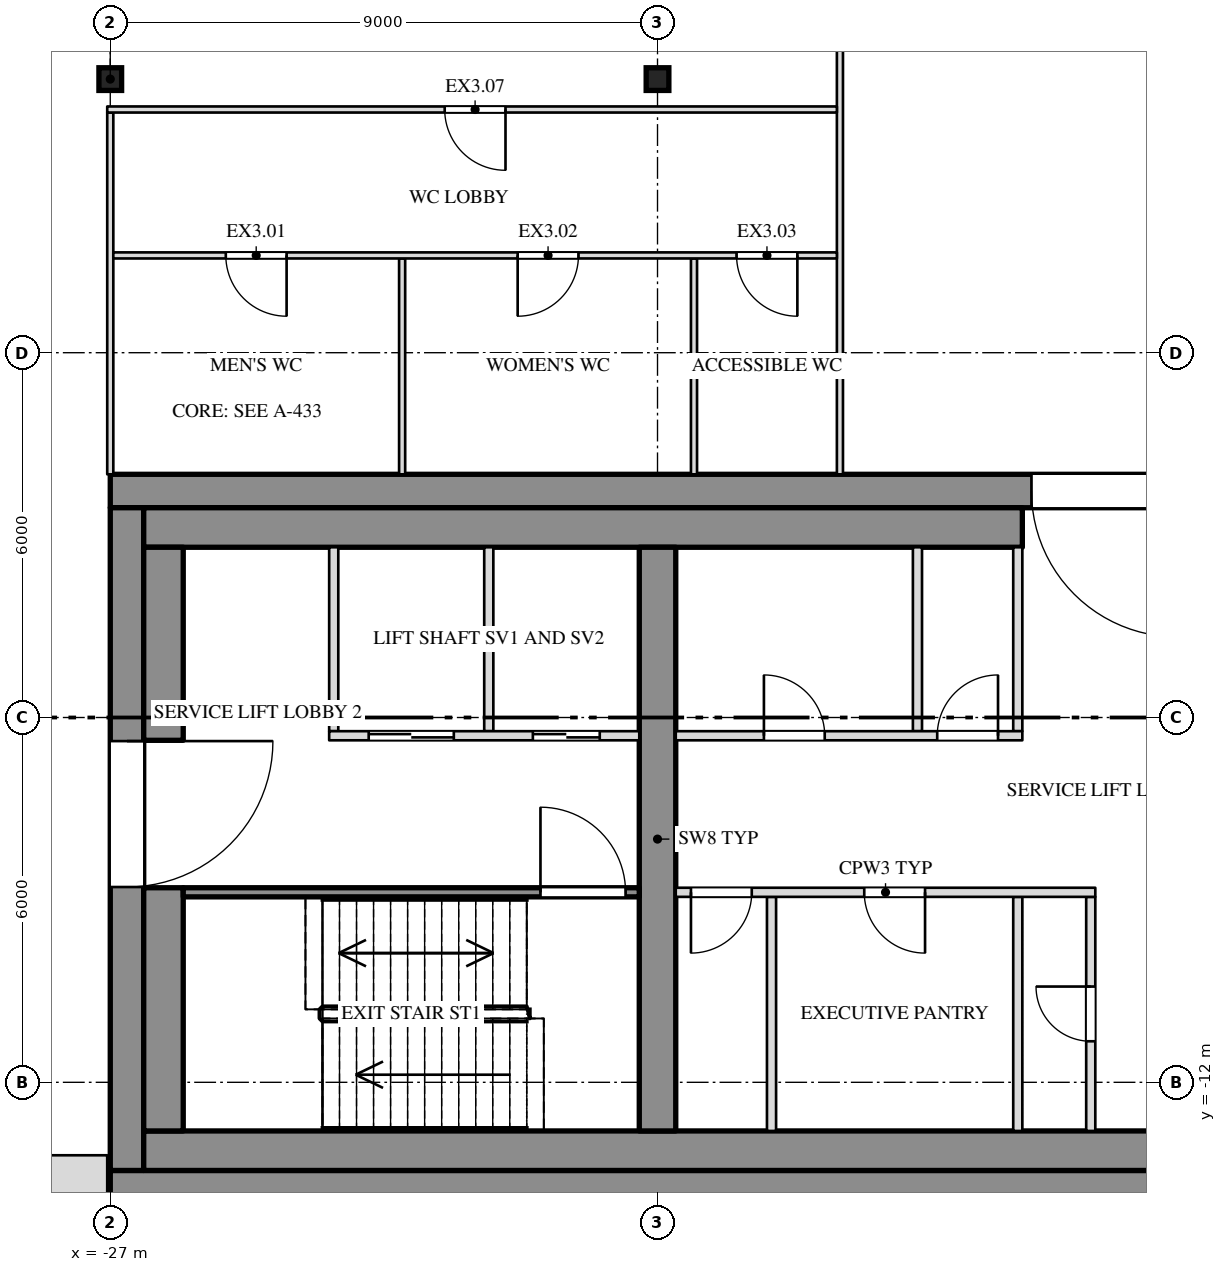
"""IFC4 building model, lengths in metres.
Left out: names, types, materials, properties, quantities, classifications, styles, units other than length and angle.
Written with IfcOpenShell. Run it as: python <this file> out.ifc"""

import sys

from ifc_helpers import new_model, si_unit, direction, frame, frame_2d, origin, origin_2d, place, context, subcontext, project, spatial, rectangle, i_section, extrude, element, fill, save


model = new_model("IFC4")
c1 = context("Model", 3, precision=1e-05, world=origin(), true_north=direction((0.0, 1.0)))
c2 = subcontext(c1, "Body", "Model", "MODEL_VIEW")
j1 = project(units=[si_unit("LENGTHUNIT", "METRE"), si_unit("PLANEANGLEUNIT", "RADIAN")], contexts=[c1])
p1 = place(None, origin())
s1 = spatial("IfcSite", under=j1, at=p1, CompositionType="ELEMENT")
p2 = place(p1, origin())
s2 = spatial("IfcBuilding", under=s1, at=p2, CompositionType="ELEMENT")
p3 = place(p2, frame((0.0, 0.0, 280.5)))
s3 = spatial("IfcBuildingStorey", under=s2, at=p3, CompositionType="ELEMENT", Elevation=280.5)
for number, where, z_axis, x_axis in (
    (1, (-27.0, 4.5, 0.0), (0.0, 0.0, 1.0), (1.0, 0.0, 0.0)),
    (2, (-18.0, 4.5, 0.0), (0.0, 0.0, 1.0), (1.0, 0.0, 0.0)),
):
    element("IfcColumn", number, at=place(p3, frame(where, z_axis=z_axis, x_axis=x_axis)), inside=s3, PredefinedType="COLUMN", context=c2, shape_type="SweptSolid", body=[
        extrude(i_section(OverallWidth=0.373, OverallDepth=0.373, WebThickness=0.016, FlangeThickness=0.026, at=origin_2d()), origin(), (0.0, 0.0, 1.0), 4.0),
    ])
p4 = place(p3, frame((-27.0, -2.275, 0.0), z_axis=(0.0, 0.0, 1.0), x_axis=(1.0, 0.0, 0.0)))
e3 = element("IfcWall", 3, at=p4, inside=s3, PredefinedType="SHEAR", context=c2, shape_type="SweptSolid", body=[
    extrude(rectangle(XDim=54.0, YDim=0.55, at=frame_2d((27.0, 0.0))), origin(), (0.0, 0.0, 1.0), 3.78),
])
p5 = place(p4, frame((15.15, 0.0, 0.0)))
e4 = element("IfcOpeningElement", 4, at=p5, cuts=e3, PredefinedType="OPENING", context=c2, shape_type="SweptSolid", body=[
    extrude(rectangle(XDim=2.4, YDim=2.1, at=frame_2d((1.2, 1.05))), frame((0.0, 0.287, 0.0), z_axis=(0.0, -1.0, 0.0), x_axis=(1.0, 0.0, 0.0)), (0.0, 0.0, 1.0), 0.574),
])
p6 = place(p4, frame((36.45, 0.0, 0.0)))
e5 = element("IfcOpeningElement", 5, at=p6, cuts=e3, PredefinedType="OPENING", context=c2, shape_type="SweptSolid", body=[
    extrude(rectangle(XDim=2.4, YDim=2.1, at=frame_2d((1.2, 1.05))), frame((0.0, 0.287, 0.0), z_axis=(0.0, -1.0, 0.0), x_axis=(1.0, 0.0, 0.0)), (0.0, 0.0, 1.0), 0.574),
])
p7 = place(p3, frame((-27.0, -13.725, 0.0), z_axis=(0.0, 0.0, 1.0), x_axis=(1.0, 0.0, 0.0)))
e6 = element("IfcWall", 6, at=p7, inside=s3, PredefinedType="SHEAR", context=c2, shape_type="SweptSolid", body=[
    extrude(rectangle(XDim=54.0, YDim=0.55, at=frame_2d((27.0, 0.0))), origin(), (0.0, 0.0, 1.0), 3.78),
])
p8 = place(p3, frame((-26.725, -13.45, 0.0), z_axis=(0.0, 0.0, 1.0), x_axis=(0.0, 1.0, 0.0)))
e7 = element("IfcWall", 7, at=p8, inside=s3, PredefinedType="SHEAR", context=c2, shape_type="SweptSolid", body=[
    extrude(rectangle(XDim=10.9, YDim=0.55, at=frame_2d((5.45, 0.0))), origin(), (0.0, 0.0, 1.0), 3.78),
])
p9 = place(p8, frame((4.662, 0.0, 0.0)))
e8 = element("IfcOpeningElement", 8, at=p9, cuts=e7, PredefinedType="OPENING", context=c2, shape_type="SweptSolid", body=[
    extrude(rectangle(XDim=2.4, YDim=2.1, at=frame_2d((1.2, 1.05))), frame((0.0, 0.287, 0.0), z_axis=(0.0, -1.0, 0.0), x_axis=(1.0, 0.0, 0.0)), (0.0, 0.0, 1.0), 0.574),
])
p10 = place(p3, frame((-26.45, -2.875, 0.0), z_axis=(0.0, 0.0, 1.0), x_axis=(1.0, 0.0, 0.0)))
e9 = element("IfcWall", 9, at=p10, inside=s3, PredefinedType="SHEAR", context=c2, shape_type="SweptSolid", body=[
    extrude(rectangle(XDim=14.45, YDim=0.65, at=frame_2d((7.225, 0.0))), origin(), (0.0, 0.0, 1.0), 3.78),
])
p11 = place(p3, frame((-26.45, -13.125, 0.0), z_axis=(0.0, 0.0, 1.0), x_axis=(1.0, 0.0, 0.0)))
e10 = element("IfcWall", 10, at=p11, inside=s3, PredefinedType="SHEAR", context=c2, shape_type="SweptSolid", body=[
    extrude(rectangle(XDim=52.9, YDim=0.65, at=frame_2d((26.45, 0.0))), origin(), (0.0, 0.0, 1.0), 3.78),
])
p12 = place(p3, frame((-26.125, -12.8, 0.0), z_axis=(0.0, 0.0, 1.0), x_axis=(0.0, 1.0, 0.0)))
e11 = element("IfcWall", 11, at=p12, inside=s3, PredefinedType="SHEAR", context=c2, shape_type="SweptSolid", body=[
    extrude(rectangle(XDim=4.0, YDim=0.65, at=frame_2d((2.0, 0.0))), origin(), (0.0, 0.0, 1.0), 3.78),
])
p13 = place(p3, frame((-26.125, -6.375, 0.0), z_axis=(0.0, 0.0, 1.0), x_axis=(0.0, 1.0, 0.0)))
e12 = element("IfcWall", 12, at=p13, inside=s3, PredefinedType="SHEAR", context=c2, shape_type="SweptSolid", body=[
    extrude(rectangle(XDim=3.175, YDim=0.65, at=frame_2d((1.587, 0.0))), origin(), (0.0, 0.0, 1.0), 3.78),
])
p14 = place(p3, frame((-18.0, -12.8, 0.0), z_axis=(0.0, 0.0, 1.0), x_axis=(0.0, 1.0, 0.0)))
e13 = element("IfcWall", 13, at=p14, inside=s3, PredefinedType="SHEAR", context=c2, shape_type="SweptSolid", body=[
    extrude(rectangle(XDim=9.6, YDim=0.6, at=frame_2d((4.8, 0.0))), origin(), (0.0, 0.0, 1.0), 3.78),
])
p15 = place(p3, frame((-27.0, -2.0, 0.0), z_axis=(0.0, 0.0, 1.0), x_axis=(0.0, 1.0, 0.0)))
e14 = element("IfcWall", 14, at=p15, inside=s3, PredefinedType="PARTITIONING", context=c2, shape_type="SweptSolid", body=[
    extrude(rectangle(XDim=5.95, YDim=0.1, at=frame_2d((2.975, 0.0))), origin(), (0.0, 0.0, 1.0), 2.848),
])
for number, where, z_axis, x_axis in (
    (15, (-22.2, -2.0, 0.0), (0.0, 0.0, 1.0), (0.0, 1.0, 0.0)),
    (16, (-17.4, -2.0, 0.0), (0.0, 0.0, 1.0), (0.0, 1.0, 0.0)),
):
    element("IfcWall", number, at=place(p3, frame(where, z_axis=z_axis, x_axis=x_axis)), inside=s3, PredefinedType="PARTITIONING", context=c2, shape_type="SweptSolid", body=[
        extrude(rectangle(XDim=3.55, YDim=0.1, at=frame_2d((1.775, 0.0))), origin(), (0.0, 0.0, 1.0), 3.78),
    ])
p16 = place(p3, frame((-15.0, -2.0, 0.0), z_axis=(0.0, 0.0, 1.0), x_axis=(0.0, 1.0, 0.0)))
e17 = element("IfcWall", 17, at=p16, inside=s3, PredefinedType="PARTITIONING", context=c2, shape_type="SweptSolid", body=[
    extrude(rectangle(XDim=38.2, YDim=0.1, at=frame_2d((19.1, 0.0))), origin(), (0.0, 0.0, 1.0), 3.78),
])
p17 = place(p16, frame((13.03, 0.0, 0.0)))
e18 = element("IfcOpeningElement", 18, at=p17, cuts=e17, PredefinedType="OPENING", context=c2, shape_type="SweptSolid", body=[
    extrude(rectangle(XDim=0.9, YDim=2.1, at=frame_2d((0.45, 1.05))), frame((0.0, 0.062, 0.0), z_axis=(0.0, -1.0, 0.0), x_axis=(1.0, 0.0, 0.0)), (0.0, 0.0, 1.0), 0.124),
])
p18 = place(p16, frame((22.77, 0.0, 0.0)))
e19 = element("IfcOpeningElement", 19, at=p18, cuts=e17, PredefinedType="OPENING", context=c2, shape_type="SweptSolid", body=[
    extrude(rectangle(XDim=0.9, YDim=2.1, at=frame_2d((0.45, 1.05))), frame((0.0, 0.062, 0.0), z_axis=(0.0, -1.0, 0.0), x_axis=(1.0, 0.0, 0.0)), (0.0, 0.0, 1.0), 0.124),
])
p19 = place(p16, frame((32.71, 0.0, 0.0)))
e20 = element("IfcOpeningElement", 20, at=p19, cuts=e17, PredefinedType="OPENING", context=c2, shape_type="SweptSolid", body=[
    extrude(rectangle(XDim=0.9, YDim=2.1, at=frame_2d((0.45, 1.05))), frame((0.0, 0.062, 0.0), z_axis=(0.0, -1.0, 0.0), x_axis=(1.0, 0.0, 0.0)), (0.0, 0.0, 1.0), 0.124),
])
p20 = place(p3, frame((-26.95, 1.6, 0.0), z_axis=(0.0, 0.0, 1.0), x_axis=(1.0, 0.0, 0.0)))
e21 = element("IfcWall", 21, at=p20, inside=s3, PredefinedType="PARTITIONING", context=c2, shape_type="SweptSolid", body=[
    extrude(rectangle(XDim=11.9, YDim=0.1, at=frame_2d((5.95, 0.0))), origin(), (0.0, 0.0, 1.0), 3.78),
])
p21 = place(p20, frame((1.85, 0.0, 0.0)))
e22 = element("IfcOpeningElement", 22, at=p21, cuts=e21, PredefinedType="OPENING", context=c2, shape_type="SweptSolid", body=[
    extrude(rectangle(XDim=1.0, YDim=2.1, at=frame_2d((0.5, 1.05))), frame((0.0, 0.062, 0.0), z_axis=(0.0, -1.0, 0.0), x_axis=(1.0, 0.0, 0.0)), (0.0, 0.0, 1.0), 0.124),
])
p22 = place(p20, frame((6.65, 0.0, 0.0)))
e23 = element("IfcOpeningElement", 23, at=p22, cuts=e21, PredefinedType="OPENING", context=c2, shape_type="SweptSolid", body=[
    extrude(rectangle(XDim=1.0, YDim=2.1, at=frame_2d((0.5, 1.05))), frame((0.0, 0.062, 0.0), z_axis=(0.0, -1.0, 0.0), x_axis=(1.0, 0.0, 0.0)), (0.0, 0.0, 1.0), 0.124),
])
p23 = place(p20, frame((10.25, 0.0, 0.0)))
e24 = element("IfcOpeningElement", 24, at=p23, cuts=e21, PredefinedType="OPENING", context=c2, shape_type="SweptSolid", body=[
    extrude(rectangle(XDim=1.0, YDim=2.1, at=frame_2d((0.5, 1.05))), frame((0.0, 0.062, 0.0), z_axis=(0.0, -1.0, 0.0), x_axis=(1.0, 0.0, 0.0)), (0.0, 0.0, 1.0), 0.124),
])
p24 = place(p3, frame((-27.05, 4.0, 0.0), z_axis=(0.0, 0.0, 1.0), x_axis=(1.0, 0.0, 0.0)))
e25 = element("IfcWall", 25, at=p24, inside=s3, PredefinedType="PARTITIONING", context=c2, shape_type="SweptSolid", body=[
    extrude(rectangle(XDim=12.0, YDim=0.1, at=frame_2d((6.0, 0.0))), origin(), (0.0, 0.0, 1.0), 3.78),
])
p25 = place(p24, frame((5.55, 0.0, 0.0)))
e26 = element("IfcOpeningElement", 26, at=p25, cuts=e25, PredefinedType="OPENING", context=c2, shape_type="SweptSolid", body=[
    extrude(rectangle(XDim=1.0, YDim=2.1, at=frame_2d((0.5, 1.05))), frame((0.0, 0.062, 0.0), z_axis=(0.0, -1.0, 0.0), x_axis=(1.0, 0.0, 0.0)), (0.0, 0.0, 1.0), 0.124),
])
p26 = place(p3, frame((-29.948, -13.6, 0.0), z_axis=(0.0, 0.0, 1.0), x_axis=(1.0, 0.0, 0.0)))
e27 = element("IfcWall", 27, at=p26, inside=s3, PredefinedType="SOLIDWALL", context=c2, shape_type="SweptSolid", body=[
    extrude(rectangle(XDim=2.897, YDim=0.8, at=frame_2d((1.449, 0.0))), origin(), (0.0, 0.0, 1.0), 3.78),
])
for number, where, z_axis, x_axis in (
    (28, (-20.775, -6.225, 0.0), (0.0, 0.0, 1.0), (0.0, 1.0, 0.0)),
    (29, (-23.325, -6.225, 0.0), (0.0, 0.0, 1.0), (0.0, 1.0, 0.0)),
    (30, (-12.075, -6.225, 0.0), (0.0, 0.0, 1.0), (0.0, 1.0, 0.0)),
    (31, (-13.725, -6.225, 0.0), (0.0, 0.0, 1.0), (0.0, 1.0, 0.0)),
):
    element("IfcWall", number, at=place(p3, frame(where, z_axis=z_axis, x_axis=x_axis)), inside=s3, PredefinedType="PARTITIONING", context=c2, shape_type="SweptSolid", body=[
        extrude(rectangle(XDim=3.025, YDim=0.15, at=frame_2d((1.513, 0.0))), origin(), (0.0, 0.0, 1.0), 3.78),
    ])
p27 = place(p3, frame((-10.875, -12.8, 0.0), z_axis=(0.0, 0.0, 1.0), x_axis=(0.0, 1.0, 0.0)))
e32 = element("IfcWall", 32, at=p27, inside=s3, PredefinedType="PARTITIONING", context=c2, shape_type="SweptSolid", body=[
    extrude(rectangle(XDim=3.85, YDim=0.15, at=frame_2d((1.925, 0.0))), origin(), (0.0, 0.0, 1.0), 3.78),
])
p28 = place(p27, frame((1.475, 0.0, 0.0)))
e33 = element("IfcOpeningElement", 33, at=p28, cuts=e32, PredefinedType="OPENING", context=c2, shape_type="SweptSolid", body=[
    extrude(rectangle(XDim=0.9, YDim=2.1, at=frame_2d((0.45, 1.05))), frame((0.0, 0.087, 0.0), z_axis=(0.0, -1.0, 0.0), x_axis=(1.0, 0.0, 0.0)), (0.0, 0.0, 1.0), 0.174),
])
for number, where, z_axis, x_axis in (
    (34, (-12.075, -12.8, 0.0), (0.0, 0.0, 1.0), (0.0, 1.0, 0.0)),
    (35, (-16.125, -12.8, 0.0), (0.0, 0.0, 1.0), (0.0, 1.0, 0.0)),
):
    element("IfcWall", number, at=place(p3, frame(where, z_axis=z_axis, x_axis=x_axis)), inside=s3, PredefinedType="PARTITIONING", context=c2, shape_type="SweptSolid", body=[
        extrude(rectangle(XDim=3.85, YDim=0.15, at=frame_2d((1.925, 0.0))), origin(), (0.0, 0.0, 1.0), 3.78),
    ])
p29 = place(p3, frame((-23.4, -6.3, 0.0), z_axis=(0.0, 0.0, 1.0), x_axis=(1.0, 0.0, 0.0)))
e36 = element("IfcWall", 36, at=p29, inside=s3, PredefinedType="PARTITIONING", context=c2, shape_type="SweptSolid", body=[
    extrude(rectangle(XDim=5.1, YDim=0.15, at=frame_2d((2.55, 0.0))), origin(), (0.0, 0.0, 1.0), 3.78),
])
p30 = place(p29, frame((0.65, 0.0, 0.0)))
e37 = element("IfcOpeningElement", 37, at=p30, cuts=e36, PredefinedType="OPENING", context=c2, shape_type="SweptSolid", body=[
    extrude(rectangle(XDim=1.4, YDim=2.1, at=frame_2d((0.7, 1.05))), frame((0.0, 0.087, 0.0), z_axis=(0.0, -1.0, 0.0), x_axis=(1.0, 0.0, 0.0)), (0.0, 0.0, 1.0), 0.174),
])
p31 = place(p29, frame((3.35, 0.0, 0.0)))
e38 = element("IfcOpeningElement", 38, at=p31, cuts=e36, PredefinedType="OPENING", context=c2, shape_type="SweptSolid", body=[
    extrude(rectangle(XDim=1.1, YDim=2.1, at=frame_2d((0.55, 1.05))), frame((0.0, 0.087, 0.0), z_axis=(0.0, -1.0, 0.0), x_axis=(1.0, 0.0, 0.0)), (0.0, 0.0, 1.0), 0.174),
])
p32 = place(p3, frame((-17.7, -6.3, 0.0), z_axis=(0.0, 0.0, 1.0), x_axis=(1.0, 0.0, 0.0)))
e39 = element("IfcWall", 39, at=p32, inside=s3, PredefinedType="PARTITIONING", context=c2, shape_type="SweptSolid", body=[
    extrude(rectangle(XDim=5.7, YDim=0.15, at=frame_2d((2.85, 0.0))), origin(), (0.0, 0.0, 1.0), 3.78),
])
p33 = place(p32, frame((1.45, 0.0, 0.0)))
e40 = element("IfcOpeningElement", 40, at=p33, cuts=e39, PredefinedType="OPENING", context=c2, shape_type="SweptSolid", body=[
    extrude(rectangle(XDim=1.0, YDim=2.1, at=frame_2d((0.5, 1.05))), frame((0.0, 0.087, 0.0), z_axis=(0.0, -1.0, 0.0), x_axis=(1.0, 0.0, 0.0)), (0.0, 0.0, 1.0), 0.174),
])
p34 = place(p32, frame((4.3, 0.0, 0.0)))
e41 = element("IfcOpeningElement", 41, at=p34, cuts=e39, PredefinedType="OPENING", context=c2, shape_type="SweptSolid", body=[
    extrude(rectangle(XDim=1.0, YDim=2.1, at=frame_2d((0.5, 1.05))), frame((0.0, 0.087, 0.0), z_axis=(0.0, -1.0, 0.0), x_axis=(1.0, 0.0, 0.0)), (0.0, 0.0, 1.0), 0.174),
])
p35 = place(p3, frame((-25.8, -8.875, 0.0), z_axis=(0.0, 0.0, 1.0), x_axis=(1.0, 0.0, 0.0)))
e42 = element("IfcWall", 42, at=p35, inside=s3, PredefinedType="SHEAR", context=c2, shape_type="SweptSolid", body=[
    extrude(rectangle(XDim=7.5, YDim=0.15, at=frame_2d((3.75, 0.0))), origin(), (0.0, 0.0, 1.0), 3.78),
])
p36 = place(p35, frame((5.875, 0.0, 0.0)))
e43 = element("IfcOpeningElement", 43, at=p36, cuts=e42, PredefinedType="OPENING", context=c2, shape_type="SweptSolid", body=[
    extrude(rectangle(XDim=1.4, YDim=2.1, at=frame_2d((0.7, 1.05))), frame((0.0, 0.087, 0.0), z_axis=(0.0, -1.0, 0.0), x_axis=(1.0, 0.0, 0.0)), (0.0, 0.0, 1.0), 0.174),
])
p37 = place(p3, frame((-17.7, -8.875, 0.0), z_axis=(0.0, 0.0, 1.0), x_axis=(1.0, 0.0, 0.0)))
e44 = element("IfcWall", 44, at=p37, inside=s3, PredefinedType="PARTITIONING", context=c2, shape_type="SweptSolid", body=[
    extrude(rectangle(XDim=6.9, YDim=0.15, at=frame_2d((3.45, 0.0))), origin(), (0.0, 0.0, 1.0), 3.78),
])
p38 = place(p37, frame((0.25, 0.0, 0.0)))
e45 = element("IfcOpeningElement", 45, at=p38, cuts=e44, PredefinedType="OPENING", context=c2, shape_type="SweptSolid", body=[
    extrude(rectangle(XDim=1.0, YDim=2.1, at=frame_2d((0.5, 1.05))), frame((0.0, 0.087, 0.0), z_axis=(0.0, -1.0, 0.0), x_axis=(1.0, 0.0, 0.0)), (0.0, 0.0, 1.0), 0.174),
])
p39 = place(p37, frame((3.1, 0.0, 0.0)))
e46 = element("IfcOpeningElement", 46, at=p39, cuts=e44, PredefinedType="OPENING", context=c2, shape_type="SweptSolid", body=[
    extrude(rectangle(XDim=1.0, YDim=2.1, at=frame_2d((0.5, 1.05))), frame((0.0, 0.087, 0.0), z_axis=(0.0, -1.0, 0.0), x_axis=(1.0, 0.0, 0.0)), (0.0, 0.0, 1.0), 0.174),
])
p40 = place(p21, origin())
e47 = element("IfcDoor", 47, at=p40, inside=s3, OperationType="SINGLE_SWING_LEFT", PredefinedType="DOOR", context=c2, shape_type="SweptSolid", body=[
    extrude(rectangle(XDim=1.0, YDim=2.1, at=frame_2d((0.5, 1.05))), frame((0.0, 0.025, 0.0), z_axis=(0.0, -1.0, 0.0), x_axis=(1.0, 0.0, 0.0)), (0.0, 0.0, 1.0), 0.05),
])
fill(e22, e47)
p41 = place(p22, origin())
e48 = element("IfcDoor", 48, at=p41, inside=s3, OperationType="SINGLE_SWING_RIGHT", PredefinedType="DOOR", context=c2, shape_type="SweptSolid", body=[
    extrude(rectangle(XDim=1.0, YDim=2.1, at=frame_2d((0.5, 1.05))), frame((0.0, 0.025, 0.0), z_axis=(0.0, -1.0, 0.0), x_axis=(1.0, 0.0, 0.0)), (0.0, 0.0, 1.0), 0.05),
])
fill(e23, e48)
p42 = place(p23, origin())
e49 = element("IfcDoor", 49, at=p42, inside=s3, OperationType="SINGLE_SWING_LEFT", PredefinedType="DOOR", context=c2, shape_type="SweptSolid", body=[
    extrude(rectangle(XDim=1.0, YDim=2.1, at=frame_2d((0.5, 1.05))), frame((0.0, 0.025, 0.0), z_axis=(0.0, -1.0, 0.0), x_axis=(1.0, 0.0, 0.0)), (0.0, 0.0, 1.0), 0.05),
])
fill(e24, e49)
p43 = place(p25, origin())
e50 = element("IfcDoor", 50, at=p43, inside=s3, OperationType="SINGLE_SWING_LEFT", PredefinedType="DOOR", context=c2, shape_type="SweptSolid", body=[
    extrude(rectangle(XDim=1.0, YDim=2.1, at=frame_2d((0.5, 1.05))), frame((0.0, 0.025, 0.0), z_axis=(0.0, -1.0, 0.0), x_axis=(1.0, 0.0, 0.0)), (0.0, 0.0, 1.0), 0.05),
])
fill(e26, e50)
p44 = place(p9, origin())
e51 = element("IfcDoor", 51, at=p44, inside=s3, OperationType="DOUBLE_DOOR_SINGLE_SWING", PredefinedType="DOOR", context=c2, shape_type="SweptSolid", body=[
    extrude(rectangle(XDim=2.4, YDim=2.1, at=frame_2d((1.2, 1.05))), frame((0.0, 0.025, 0.0), z_axis=(0.0, -1.0, 0.0), x_axis=(1.0, 0.0, 0.0)), (0.0, 0.0, 1.0), 0.05),
])
fill(e8, e51)
p45 = place(p30, origin())
e52 = element("IfcDoor", 52, at=p45, inside=s3, OperationType="SLIDING_TO_RIGHT", PredefinedType="DOOR", context=c2, shape_type="SweptSolid", body=[
    extrude(rectangle(XDim=1.4, YDim=2.1, at=frame_2d((0.7, 1.05))), frame((0.0, 0.025, 0.0), z_axis=(0.0, -1.0, 0.0), x_axis=(1.0, 0.0, 0.0)), (0.0, 0.0, 1.0), 0.05),
])
fill(e37, e52)
p46 = place(p31, origin())
e53 = element("IfcDoor", 53, at=p46, inside=s3, OperationType="SLIDING_TO_LEFT", PredefinedType="DOOR", context=c2, shape_type="SweptSolid", body=[
    extrude(rectangle(XDim=1.1, YDim=2.1, at=frame_2d((0.55, 1.05))), frame((0.0, 0.025, 0.0), z_axis=(0.0, -1.0, 0.0), x_axis=(1.0, 0.0, 0.0)), (0.0, 0.0, 1.0), 0.05),
])
fill(e38, e53)
p47 = place(p36, origin())
e54 = element("IfcDoor", 54, at=p47, inside=s3, OperationType="DOUBLE_DOOR_SINGLE_SWING", PredefinedType="DOOR", context=c2, shape_type="SweptSolid", body=[
    extrude(rectangle(XDim=1.4, YDim=2.1, at=frame_2d((0.7, 1.05))), frame((0.0, 0.025, 0.0), z_axis=(0.0, -1.0, 0.0), x_axis=(1.0, 0.0, 0.0)), (0.0, 0.0, 1.0), 0.05),
])
fill(e43, e54)
p48 = place(p38, origin())
e55 = element("IfcDoor", 55, at=p48, inside=s3, OperationType="SINGLE_SWING_RIGHT", PredefinedType="DOOR", context=c2, shape_type="SweptSolid", body=[
    extrude(rectangle(XDim=1.0, YDim=2.1, at=frame_2d((0.5, 1.05))), frame((0.0, 0.025, 0.0), z_axis=(0.0, -1.0, 0.0), x_axis=(1.0, 0.0, 0.0)), (0.0, 0.0, 1.0), 0.05),
])
fill(e45, e55)
p49 = place(p33, origin())
e56 = element("IfcDoor", 56, at=p49, inside=s3, OperationType="SINGLE_SWING_LEFT", PredefinedType="DOOR", context=c2, shape_type="SweptSolid", body=[
    extrude(rectangle(XDim=1.0, YDim=2.1, at=frame_2d((0.5, 1.05))), frame((0.0, 0.025, 0.0), z_axis=(0.0, -1.0, 0.0), x_axis=(1.0, 0.0, 0.0)), (0.0, 0.0, 1.0), 0.05),
])
fill(e40, e56)
p50 = place(p39, origin())
e57 = element("IfcDoor", 57, at=p50, inside=s3, OperationType="SINGLE_SWING_LEFT", PredefinedType="DOOR", context=c2, shape_type="SweptSolid", body=[
    extrude(rectangle(XDim=1.0, YDim=2.1, at=frame_2d((0.5, 1.05))), frame((0.0, 0.025, 0.0), z_axis=(0.0, -1.0, 0.0), x_axis=(1.0, 0.0, 0.0)), (0.0, 0.0, 1.0), 0.05),
])
fill(e46, e57)
p51 = place(p34, origin())
e58 = element("IfcDoor", 58, at=p51, inside=s3, OperationType="SINGLE_SWING_RIGHT", PredefinedType="DOOR", context=c2, shape_type="SweptSolid", body=[
    extrude(rectangle(XDim=1.0, YDim=2.1, at=frame_2d((0.5, 1.05))), frame((0.0, 0.025, 0.0), z_axis=(0.0, -1.0, 0.0), x_axis=(1.0, 0.0, 0.0)), (0.0, 0.0, 1.0), 0.05),
])
fill(e41, e58)
p52 = place(p28, origin())
e59 = element("IfcDoor", 59, at=p52, inside=s3, OperationType="SINGLE_SWING_RIGHT", PredefinedType="DOOR", context=c2, shape_type="SweptSolid", body=[
    extrude(rectangle(XDim=0.9, YDim=2.1, at=frame_2d((0.45, 1.05))), frame((0.0, 0.025, 0.0), z_axis=(0.0, -1.0, 0.0), x_axis=(1.0, 0.0, 0.0)), (0.0, 0.0, 1.0), 0.05),
])
fill(e33, e59)
p53 = place(p5, origin())
e60 = element("IfcDoor", 60, at=p53, inside=s3, OperationType="DOUBLE_DOOR_SINGLE_SWING", PredefinedType="DOOR", context=c2, shape_type="SweptSolid", body=[
    extrude(rectangle(XDim=2.4, YDim=2.1, at=frame_2d((1.2, 1.05))), frame((0.0, 0.025, 0.0), z_axis=(0.0, -1.0, 0.0), x_axis=(1.0, 0.0, 0.0)), (0.0, 0.0, 1.0), 0.05),
])
fill(e4, e60)
save(model, sys.argv[1])
